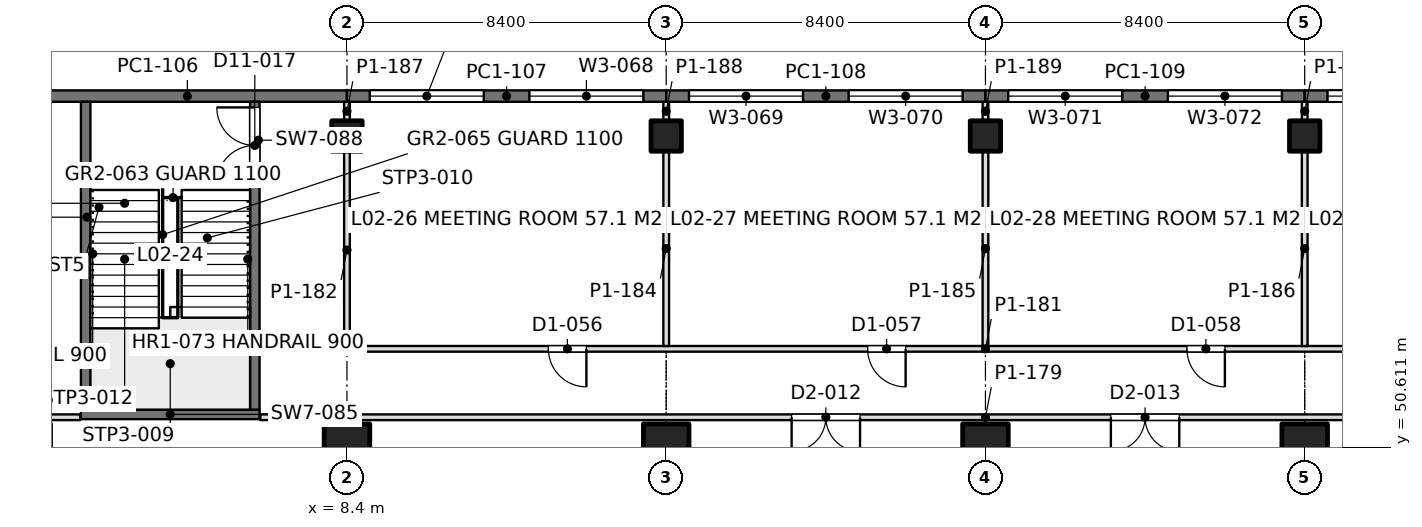
"""IFC4 building model, lengths in metres.
Left out: names, types, materials, properties, quantities, classifications, styles, units other than length and angle.
Written with IfcOpenShell. Run it as: python <this file> out.ifc"""

import sys

from ifc_helpers import new_model, si_unit, direction, frame, frame_2d, origin, origin_2d, place, context, subcontext, project, spatial, rectangle, extrude, element, fill, save


model = new_model("IFC4")
c1 = context("Model", 3, precision=1e-05, world=origin(), true_north=direction((0.0, 1.0)))
c2 = subcontext(c1, "Body", "Model", "MODEL_VIEW")
j1 = project(units=[si_unit("LENGTHUNIT", "METRE"), si_unit("PLANEANGLEUNIT", "RADIAN")], contexts=[c1])
p1 = place(None, origin())
s1 = spatial("IfcSite", under=j1, at=p1, CompositionType="ELEMENT")
p2 = place(p1, origin())
s2 = spatial("IfcBuilding", under=s1, at=p2, CompositionType="ELEMENT")
p3 = place(p2, frame((0.0, 0.0, 9.9)))
s3 = spatial("IfcBuildingStorey", under=s2, at=p3, CompositionType="ELEMENT", Elevation=9.9)
p4 = place(p3, frame((8.4, 50.4, 0.0), z_axis=(0.0, 0.0, 1.0), x_axis=(1.0, 0.0, 0.0)))
e1 = element("IfcColumn", 1, at=p4, inside=s3, PredefinedType="COLUMN", context=c2, shape_type="SweptSolid", body=[
    extrude(rectangle(XDim=1.2, YDim=1.65, at=origin_2d()), origin(), (0.0, 0.0, 1.0), 4.5),
])
p5 = place(p3, frame((8.4, 58.8, 0.0), z_axis=(0.0, 0.0, 1.0), x_axis=(1.0, 0.0, 0.0)))
e2 = element("IfcColumn", 2, at=p5, inside=s3, PredefinedType="COLUMN", context=c2, shape_type="SweptSolid", body=[
    extrude(rectangle(XDim=0.8, YDim=0.8, at=origin_2d()), origin(), (0.0, 0.0, 1.0), 4.5),
])
p6 = place(p3, frame((16.8, 50.4, 0.0), z_axis=(0.0, 0.0, 1.0), x_axis=(1.0, 0.0, 0.0)))
e3 = element("IfcColumn", 3, at=p6, inside=s3, PredefinedType="COLUMN", context=c2, shape_type="SweptSolid", body=[
    extrude(rectangle(XDim=1.2, YDim=1.65, at=origin_2d()), origin(), (0.0, 0.0, 1.0), 4.5),
])
p7 = place(p3, frame((16.8, 58.8, 0.0), z_axis=(0.0, 0.0, 1.0), x_axis=(1.0, 0.0, 0.0)))
e4 = element("IfcColumn", 4, at=p7, inside=s3, PredefinedType="COLUMN", context=c2, shape_type="SweptSolid", body=[
    extrude(rectangle(XDim=0.8, YDim=0.8, at=origin_2d()), origin(), (0.0, 0.0, 1.0), 4.5),
])
p8 = place(p3, frame((25.2, 50.4, 0.0), z_axis=(0.0, 0.0, 1.0), x_axis=(1.0, 0.0, 0.0)))
e5 = element("IfcColumn", 5, at=p8, inside=s3, PredefinedType="COLUMN", context=c2, shape_type="SweptSolid", body=[
    extrude(rectangle(XDim=1.2, YDim=1.65, at=origin_2d()), origin(), (0.0, 0.0, 1.0), 4.5),
])
p9 = place(p3, frame((25.2, 58.8, 0.0), z_axis=(0.0, 0.0, 1.0), x_axis=(1.0, 0.0, 0.0)))
e6 = element("IfcColumn", 6, at=p9, inside=s3, PredefinedType="COLUMN", context=c2, shape_type="SweptSolid", body=[
    extrude(rectangle(XDim=0.8, YDim=0.8, at=origin_2d()), origin(), (0.0, 0.0, 1.0), 4.5),
])
p10 = place(p3, frame((33.6, 50.4, 0.0), z_axis=(0.0, 0.0, 1.0), x_axis=(1.0, 0.0, 0.0)))
e7 = element("IfcColumn", 7, at=p10, inside=s3, PredefinedType="COLUMN", context=c2, shape_type="SweptSolid", body=[
    extrude(rectangle(XDim=1.2, YDim=1.65, at=origin_2d()), origin(), (0.0, 0.0, 1.0), 4.5),
])
p11 = place(p3, frame((33.6, 58.8, 0.0), z_axis=(0.0, 0.0, 1.0), x_axis=(1.0, 0.0, 0.0)))
e8 = element("IfcColumn", 8, at=p11, inside=s3, PredefinedType="COLUMN", context=c2, shape_type="SweptSolid", body=[
    extrude(rectangle(XDim=0.8, YDim=0.8, at=origin_2d()), origin(), (0.0, 0.0, 1.0), 4.5),
])
p12 = place(p3, frame((0.0, 59.85, 0.0), z_axis=(0.0, 0.0, 1.0), x_axis=(1.0, 0.0, 0.0)))
e9 = element("IfcWall", 9, at=p12, inside=s3, PredefinedType="SOLIDWALL", context=c2, shape_type="SweptSolid", body=[
    extrude(rectangle(XDim=8.4, YDim=0.3, at=frame_2d((4.2, 0.0))), origin(), (0.0, 0.0, 1.0), 4.3),
])
p13 = place(p3, frame((8.4, 59.85, 0.0), z_axis=(0.0, 0.0, 1.0), x_axis=(1.0, 0.0, 0.0)))
e10 = element("IfcWall", 10, at=p13, inside=s3, PredefinedType="SOLIDWALL", context=c2, shape_type="SweptSolid", body=[
    extrude(rectangle(XDim=8.4, YDim=0.3, at=frame_2d((4.2, 0.0))), origin(), (0.0, 0.0, 1.0), 4.3),
])
p14 = place(p13, frame((0.6, 0.0, 0.9)))
e11 = element("IfcOpeningElement", 11, at=p14, cuts=e10, PredefinedType="OPENING", context=c2, shape_type="SweptSolid", body=[
    extrude(rectangle(XDim=3.0, YDim=2.4, at=frame_2d((1.5, 1.2))), frame((0.0, 0.16, 0.0), z_axis=(0.0, -1.0, 0.0), x_axis=(1.0, 0.0, 0.0)), (0.0, 0.0, 1.0), 0.32),
])
p15 = place(p13, frame((4.8, 0.0, 0.9)))
e12 = element("IfcOpeningElement", 12, at=p15, cuts=e10, PredefinedType="OPENING", context=c2, shape_type="SweptSolid", body=[
    extrude(rectangle(XDim=3.0, YDim=2.4, at=frame_2d((1.5, 1.2))), frame((0.0, 0.16, 0.0), z_axis=(0.0, -1.0, 0.0), x_axis=(1.0, 0.0, 0.0)), (0.0, 0.0, 1.0), 0.32),
])
p16 = place(p3, frame((16.8, 59.85, 0.0), z_axis=(0.0, 0.0, 1.0), x_axis=(1.0, 0.0, 0.0)))
e13 = element("IfcWall", 13, at=p16, inside=s3, PredefinedType="SOLIDWALL", context=c2, shape_type="SweptSolid", body=[
    extrude(rectangle(XDim=8.4, YDim=0.3, at=frame_2d((4.2, 0.0))), origin(), (0.0, 0.0, 1.0), 4.3),
])
p17 = place(p16, frame((0.6, 0.0, 0.9)))
e14 = element("IfcOpeningElement", 14, at=p17, cuts=e13, PredefinedType="OPENING", context=c2, shape_type="SweptSolid", body=[
    extrude(rectangle(XDim=3.0, YDim=2.4, at=frame_2d((1.5, 1.2))), frame((0.0, 0.16, 0.0), z_axis=(0.0, -1.0, 0.0), x_axis=(1.0, 0.0, 0.0)), (0.0, 0.0, 1.0), 0.32),
])
p18 = place(p16, frame((4.8, 0.0, 0.9)))
e15 = element("IfcOpeningElement", 15, at=p18, cuts=e13, PredefinedType="OPENING", context=c2, shape_type="SweptSolid", body=[
    extrude(rectangle(XDim=3.0, YDim=2.4, at=frame_2d((1.5, 1.2))), frame((0.0, 0.16, 0.0), z_axis=(0.0, -1.0, 0.0), x_axis=(1.0, 0.0, 0.0)), (0.0, 0.0, 1.0), 0.32),
])
p19 = place(p3, frame((25.2, 59.85, 0.0), z_axis=(0.0, 0.0, 1.0), x_axis=(1.0, 0.0, 0.0)))
e16 = element("IfcWall", 16, at=p19, inside=s3, PredefinedType="SOLIDWALL", context=c2, shape_type="SweptSolid", body=[
    extrude(rectangle(XDim=8.4, YDim=0.3, at=frame_2d((4.2, 0.0))), origin(), (0.0, 0.0, 1.0), 4.3),
])
p20 = place(p19, frame((0.6, 0.0, 0.9)))
e17 = element("IfcOpeningElement", 17, at=p20, cuts=e16, PredefinedType="OPENING", context=c2, shape_type="SweptSolid", body=[
    extrude(rectangle(XDim=3.0, YDim=2.4, at=frame_2d((1.5, 1.2))), frame((0.0, 0.16, 0.0), z_axis=(0.0, -1.0, 0.0), x_axis=(1.0, 0.0, 0.0)), (0.0, 0.0, 1.0), 0.32),
])
p21 = place(p19, frame((4.8, 0.0, 0.9)))
e18 = element("IfcOpeningElement", 18, at=p21, cuts=e16, PredefinedType="OPENING", context=c2, shape_type="SweptSolid", body=[
    extrude(rectangle(XDim=3.0, YDim=2.4, at=frame_2d((1.5, 1.2))), frame((0.0, 0.16, 0.0), z_axis=(0.0, -1.0, 0.0), x_axis=(1.0, 0.0, 0.0)), (0.0, 0.0, 1.0), 0.32),
])
p22 = place(p3, frame((33.6, 59.85, 0.0), z_axis=(0.0, 0.0, 1.0), x_axis=(1.0, 0.0, 0.0)))
e19 = element("IfcWall", 19, at=p22, inside=s3, PredefinedType="SOLIDWALL", context=c2, shape_type="SweptSolid", body=[
    extrude(rectangle(XDim=8.4, YDim=0.3, at=frame_2d((4.2, 0.0))), origin(), (0.0, 0.0, 1.0), 4.3),
])
p23 = place(p22, frame((0.6, 0.0, 0.9)))
e20 = element("IfcOpeningElement", 20, at=p23, cuts=e19, PredefinedType="OPENING", context=c2, shape_type="SweptSolid", body=[
    extrude(rectangle(XDim=3.0, YDim=2.4, at=frame_2d((1.5, 1.2))), frame((0.0, 0.16, 0.0), z_axis=(0.0, -1.0, 0.0), x_axis=(1.0, 0.0, 0.0)), (0.0, 0.0, 1.0), 0.32),
])
p24 = place(p22, frame((4.8, 0.0, 0.9)))
e21 = element("IfcOpeningElement", 21, at=p24, cuts=e19, PredefinedType="OPENING", context=c2, shape_type="SweptSolid", body=[
    extrude(rectangle(XDim=3.0, YDim=2.4, at=frame_2d((1.5, 1.2))), frame((0.0, 0.16, 0.0), z_axis=(0.0, -1.0, 0.0), x_axis=(1.0, 0.0, 0.0)), (0.0, 0.0, 1.0), 0.32),
])
p25 = place(p3, frame((-1.0, 51.4, 0.0), z_axis=(0.0, 0.0, 1.0), x_axis=(1.0, 0.0, 0.0)))
e22 = element("IfcWall", 22, at=p25, inside=s3, PredefinedType="PARTITIONING", context=c2, shape_type="SweptSolid", body=[
    extrude(rectangle(XDim=2.38, YDim=0.15, at=frame_2d((1.19, 0.0))), origin(), (0.0, 0.0, 1.0), 3.65),
])
p26 = place(p3, frame((6.12, 51.4, 0.0), z_axis=(0.0, 0.0, 1.0), x_axis=(1.0, 0.0, 0.0)))
e23 = element("IfcWall", 23, at=p26, inside=s3, PredefinedType="PARTITIONING", context=c2, shape_type="SweptSolid", body=[
    extrude(rectangle(XDim=38.16, YDim=0.15, at=frame_2d((19.08, 0.0))), origin(), (0.0, 0.0, 1.0), 3.65),
])
p27 = place(p26, frame((13.98, 0.0, 0.0)))
e24 = element("IfcOpeningElement", 24, at=p27, cuts=e23, PredefinedType="OPENING", context=c2, shape_type="SweptSolid", body=[
    extrude(rectangle(XDim=1.8, YDim=2.2, at=frame_2d((0.9, 1.1))), frame((0.0, 0.085, 0.0), z_axis=(0.0, -1.0, 0.0), x_axis=(1.0, 0.0, 0.0)), (0.0, 0.0, 1.0), 0.17),
])
p28 = place(p26, frame((22.38, 0.0, 0.0)))
e25 = element("IfcOpeningElement", 25, at=p28, cuts=e23, PredefinedType="OPENING", context=c2, shape_type="SweptSolid", body=[
    extrude(rectangle(XDim=1.8, YDim=2.2, at=frame_2d((0.9, 1.1))), frame((0.0, 0.085, 0.0), z_axis=(0.0, -1.0, 0.0), x_axis=(1.0, 0.0, 0.0)), (0.0, 0.0, 1.0), 0.17),
])
p29 = place(p3, frame((8.4, 53.2, 0.0), z_axis=(0.0, 0.0, 1.0), x_axis=(1.0, 0.0, 0.0)))
e26 = element("IfcWall", 26, at=p29, inside=s3, PredefinedType="PARTITIONING", context=c2, shape_type="SweptSolid", body=[
    extrude(rectangle(XDim=33.6, YDim=0.15, at=frame_2d((16.8, 0.0))), origin(), (0.0, 0.0, 1.0), 3.65),
])
p30 = place(p29, frame((5.3, 0.0, 0.0)))
e27 = element("IfcOpeningElement", 27, at=p30, cuts=e26, PredefinedType="OPENING", context=c2, shape_type="SweptSolid", body=[
    extrude(rectangle(XDim=1.0, YDim=2.2, at=frame_2d((0.5, 1.1))), frame((0.0, 0.085, 0.0), z_axis=(0.0, -1.0, 0.0), x_axis=(1.0, 0.0, 0.0)), (0.0, 0.0, 1.0), 0.17),
])
p31 = place(p29, frame((13.7, 0.0, 0.0)))
e28 = element("IfcOpeningElement", 28, at=p31, cuts=e26, PredefinedType="OPENING", context=c2, shape_type="SweptSolid", body=[
    extrude(rectangle(XDim=1.0, YDim=2.2, at=frame_2d((0.5, 1.1))), frame((0.0, 0.085, 0.0), z_axis=(0.0, -1.0, 0.0), x_axis=(1.0, 0.0, 0.0)), (0.0, 0.0, 1.0), 0.17),
])
p32 = place(p29, frame((22.1, 0.0, 0.0)))
e29 = element("IfcOpeningElement", 29, at=p32, cuts=e26, PredefinedType="OPENING", context=c2, shape_type="SweptSolid", body=[
    extrude(rectangle(XDim=1.0, YDim=2.2, at=frame_2d((0.5, 1.1))), frame((0.0, 0.085, 0.0), z_axis=(0.0, -1.0, 0.0), x_axis=(1.0, 0.0, 0.0)), (0.0, 0.0, 1.0), 0.17),
])
p33 = place(p29, frame((30.5, 0.0, 0.0)))
e30 = element("IfcOpeningElement", 30, at=p33, cuts=e26, PredefinedType="OPENING", context=c2, shape_type="SweptSolid", body=[
    extrude(rectangle(XDim=1.0, YDim=2.2, at=frame_2d((0.5, 1.1))), frame((0.0, 0.085, 0.0), z_axis=(0.0, -1.0, 0.0), x_axis=(1.0, 0.0, 0.0)), (0.0, 0.0, 1.0), 0.17),
])
p34 = place(p3, frame((8.4, 53.2, 0.0), z_axis=(0.0, 0.0, 1.0), x_axis=(0.0, 1.0, 0.0)))
e31 = element("IfcWall", 31, at=p34, inside=s3, PredefinedType="PARTITIONING", context=c2, shape_type="SweptSolid", body=[
    extrude(rectangle(XDim=5.201, YDim=0.15, at=frame_2d((2.601, 0.0))), origin(), (0.0, 0.0, 1.0), 3.65),
])
p35 = place(p3, frame((8.4, 59.199, 0.0), z_axis=(0.0, 0.0, 1.0), x_axis=(0.0, 1.0, 0.0)))
e32 = element("IfcWall", 32, at=p35, inside=s3, PredefinedType="PARTITIONING", context=c2, shape_type="SweptSolid", body=[
    extrude(rectangle(XDim=0.503, YDim=0.15, at=frame_2d((0.251, 0.0))), origin(), (0.0, 0.0, 1.0), 4.3),
])
p36 = place(p3, frame((16.8, 53.274, 0.0), z_axis=(0.0, 0.0, 1.0), x_axis=(0.0, 1.0, 0.0)))
e33 = element("IfcWall", 33, at=p36, inside=s3, PredefinedType="PARTITIONING", context=c2, shape_type="SweptSolid", body=[
    extrude(rectangle(XDim=5.127, YDim=0.15, at=frame_2d((2.563, 0.0))), origin(), (0.0, 0.0, 1.0), 3.65),
])
p37 = place(p3, frame((16.8, 59.199, 0.0), z_axis=(0.0, 0.0, 1.0), x_axis=(0.0, 1.0, 0.0)))
e34 = element("IfcWall", 34, at=p37, inside=s3, PredefinedType="PARTITIONING", context=c2, shape_type="SweptSolid", body=[
    extrude(rectangle(XDim=0.503, YDim=0.15, at=frame_2d((0.251, 0.0))), origin(), (0.0, 0.0, 1.0), 4.3),
])
p38 = place(p3, frame((25.2, 53.274, 0.0), z_axis=(0.0, 0.0, 1.0), x_axis=(0.0, 1.0, 0.0)))
e35 = element("IfcWall", 35, at=p38, inside=s3, PredefinedType="PARTITIONING", context=c2, shape_type="SweptSolid", body=[
    extrude(rectangle(XDim=5.127, YDim=0.15, at=frame_2d((2.563, 0.0))), origin(), (0.0, 0.0, 1.0), 3.65),
])
p39 = place(p3, frame((25.2, 59.199, 0.0), z_axis=(0.0, 0.0, 1.0), x_axis=(0.0, 1.0, 0.0)))
e36 = element("IfcWall", 36, at=p39, inside=s3, PredefinedType="PARTITIONING", context=c2, shape_type="SweptSolid", body=[
    extrude(rectangle(XDim=0.503, YDim=0.15, at=frame_2d((0.251, 0.0))), origin(), (0.0, 0.0, 1.0), 4.3),
])
p40 = place(p3, frame((33.6, 53.274, 0.0), z_axis=(0.0, 0.0, 1.0), x_axis=(0.0, 1.0, 0.0)))
e37 = element("IfcWall", 37, at=p40, inside=s3, PredefinedType="PARTITIONING", context=c2, shape_type="SweptSolid", body=[
    extrude(rectangle(XDim=5.127, YDim=0.15, at=frame_2d((2.563, 0.0))), origin(), (0.0, 0.0, 1.0), 3.65),
])
p41 = place(p3, frame((33.6, 59.199, 0.0), z_axis=(0.0, 0.0, 1.0), x_axis=(0.0, 1.0, 0.0)))
e38 = element("IfcWall", 38, at=p41, inside=s3, PredefinedType="PARTITIONING", context=c2, shape_type="SweptSolid", body=[
    extrude(rectangle(XDim=0.503, YDim=0.15, at=frame_2d((0.251, 0.0))), origin(), (0.0, 0.0, 1.0), 4.3),
])
p42 = place(p3, frame((1.525, 59.702, 0.0), z_axis=(0.0, 0.0, 1.0), x_axis=(0.0, -1.0, 0.0)))
e39 = element("IfcWall", 39, at=p42, inside=s3, PredefinedType="SOLIDWALL", context=c2, shape_type="SweptSolid", body=[
    extrude(rectangle(XDim=8.102, YDim=0.25, at=frame_2d((4.051, 0.0))), origin(), (0.0, 0.0, 1.0), 4.5),
])
p43 = place(p3, frame((5.975, 59.702, 0.0), z_axis=(0.0, 0.0, 1.0), x_axis=(0.0, -1.0, 0.0)))
e40 = element("IfcWall", 40, at=p43, inside=s3, PredefinedType="SOLIDWALL", context=c2, shape_type="SweptSolid", body=[
    extrude(rectangle(XDim=8.102, YDim=0.25, at=frame_2d((4.051, 0.0))), origin(), (0.0, 0.0, 1.0), 4.5),
])
p44 = place(p43, frame((0.15, 0.0, 0.0)))
e41 = element("IfcOpeningElement", 41, at=p44, cuts=e40, PredefinedType="OPENING", context=c2, shape_type="SweptSolid", body=[
    extrude(rectangle(XDim=2.0, YDim=2.2, at=frame_2d((1.0, 1.1))), frame((0.0, 0.135, 0.0), z_axis=(0.0, -1.0, 0.0), x_axis=(1.0, 0.0, 0.0)), (0.0, 0.0, 1.0), 0.27),
])
p45 = place(p3, frame((1.4, 51.475, 0.0), z_axis=(0.0, 0.0, 1.0), x_axis=(1.0, 0.0, 0.0)))
e42 = element("IfcWall", 42, at=p45, inside=s3, PredefinedType="SOLIDWALL", context=c2, shape_type="SweptSolid", body=[
    extrude(rectangle(XDim=4.7, YDim=0.25, at=frame_2d((2.35, 0.0))), origin(), (0.0, 0.0, 1.0), 4.5),
])
p46 = place(p14, origin())
e43 = element("IfcWindow", 43, at=p46, inside=s3, PartitioningType="SINGLE_PANEL", PredefinedType="WINDOW", context=c2, shape_type="SweptSolid", body=[
    extrude(rectangle(XDim=3.0, YDim=2.4, at=frame_2d((1.5, 1.2))), frame((0.0, 0.03, 0.0), z_axis=(0.0, -1.0, 0.0), x_axis=(1.0, 0.0, 0.0)), (0.0, 0.0, 1.0), 0.06),
])
fill(e11, e43)
p47 = place(p15, origin())
e44 = element("IfcWindow", 44, at=p47, inside=s3, PartitioningType="SINGLE_PANEL", PredefinedType="WINDOW", context=c2, shape_type="SweptSolid", body=[
    extrude(rectangle(XDim=3.0, YDim=2.4, at=frame_2d((1.5, 1.2))), frame((0.0, 0.03, 0.0), z_axis=(0.0, -1.0, 0.0), x_axis=(1.0, 0.0, 0.0)), (0.0, 0.0, 1.0), 0.06),
])
fill(e12, e44)
p48 = place(p17, origin())
e45 = element("IfcWindow", 45, at=p48, inside=s3, PartitioningType="SINGLE_PANEL", PredefinedType="WINDOW", context=c2, shape_type="SweptSolid", body=[
    extrude(rectangle(XDim=3.0, YDim=2.4, at=frame_2d((1.5, 1.2))), frame((0.0, 0.03, 0.0), z_axis=(0.0, -1.0, 0.0), x_axis=(1.0, 0.0, 0.0)), (0.0, 0.0, 1.0), 0.06),
])
fill(e14, e45)
p49 = place(p18, origin())
e46 = element("IfcWindow", 46, at=p49, inside=s3, PartitioningType="SINGLE_PANEL", PredefinedType="WINDOW", context=c2, shape_type="SweptSolid", body=[
    extrude(rectangle(XDim=3.0, YDim=2.4, at=frame_2d((1.5, 1.2))), frame((0.0, 0.03, 0.0), z_axis=(0.0, -1.0, 0.0), x_axis=(1.0, 0.0, 0.0)), (0.0, 0.0, 1.0), 0.06),
])
fill(e15, e46)
p50 = place(p20, origin())
e47 = element("IfcWindow", 47, at=p50, inside=s3, PartitioningType="SINGLE_PANEL", PredefinedType="WINDOW", context=c2, shape_type="SweptSolid", body=[
    extrude(rectangle(XDim=3.0, YDim=2.4, at=frame_2d((1.5, 1.2))), frame((0.0, 0.03, 0.0), z_axis=(0.0, -1.0, 0.0), x_axis=(1.0, 0.0, 0.0)), (0.0, 0.0, 1.0), 0.06),
])
fill(e17, e47)
p51 = place(p21, origin())
e48 = element("IfcWindow", 48, at=p51, inside=s3, PartitioningType="SINGLE_PANEL", PredefinedType="WINDOW", context=c2, shape_type="SweptSolid", body=[
    extrude(rectangle(XDim=3.0, YDim=2.4, at=frame_2d((1.5, 1.2))), frame((0.0, 0.03, 0.0), z_axis=(0.0, -1.0, 0.0), x_axis=(1.0, 0.0, 0.0)), (0.0, 0.0, 1.0), 0.06),
])
fill(e18, e48)
p52 = place(p23, origin())
e49 = element("IfcWindow", 49, at=p52, inside=s3, PartitioningType="SINGLE_PANEL", PredefinedType="WINDOW", context=c2, shape_type="SweptSolid", body=[
    extrude(rectangle(XDim=3.0, YDim=2.4, at=frame_2d((1.5, 1.2))), frame((0.0, 0.03, 0.0), z_axis=(0.0, -1.0, 0.0), x_axis=(1.0, 0.0, 0.0)), (0.0, 0.0, 1.0), 0.06),
])
fill(e20, e49)
p53 = place(p27, frame((1.8, 0.0, 0.0), z_axis=(0.0, 0.0, 1.0), x_axis=(-1.0, 0.0, 0.0)))
e50 = element("IfcDoor", 50, at=p53, inside=s3, OperationType="DOUBLE_DOOR_SINGLE_SWING", PredefinedType="DOOR", context=c2, shape_type="SweptSolid", body=[
    extrude(rectangle(XDim=1.8, YDim=2.2, at=frame_2d((0.9, 1.1))), frame((0.0, 0.025, 0.0), z_axis=(0.0, -1.0, 0.0), x_axis=(1.0, 0.0, 0.0)), (0.0, 0.0, 1.0), 0.05),
])
fill(e24, e50)
p54 = place(p28, frame((1.8, 0.0, 0.0), z_axis=(0.0, 0.0, 1.0), x_axis=(-1.0, 0.0, 0.0)))
e51 = element("IfcDoor", 51, at=p54, inside=s3, OperationType="DOUBLE_DOOR_SINGLE_SWING", PredefinedType="DOOR", context=c2, shape_type="SweptSolid", body=[
    extrude(rectangle(XDim=1.8, YDim=2.2, at=frame_2d((0.9, 1.1))), frame((0.0, 0.025, 0.0), z_axis=(0.0, -1.0, 0.0), x_axis=(1.0, 0.0, 0.0)), (0.0, 0.0, 1.0), 0.05),
])
fill(e25, e51)
p55 = place(p30, frame((1.0, 0.0, 0.0), z_axis=(0.0, 0.0, 1.0), x_axis=(-1.0, 0.0, 0.0)))
e52 = element("IfcDoor", 52, at=p55, inside=s3, OperationType="SINGLE_SWING_LEFT", PredefinedType="DOOR", context=c2, shape_type="SweptSolid", body=[
    extrude(rectangle(XDim=1.0, YDim=2.2, at=frame_2d((0.5, 1.1))), frame((0.0, 0.025, 0.0), z_axis=(0.0, -1.0, 0.0), x_axis=(1.0, 0.0, 0.0)), (0.0, 0.0, 1.0), 0.05),
])
fill(e27, e52)
p56 = place(p31, frame((1.0, 0.0, 0.0), z_axis=(0.0, 0.0, 1.0), x_axis=(-1.0, 0.0, 0.0)))
e53 = element("IfcDoor", 53, at=p56, inside=s3, OperationType="SINGLE_SWING_LEFT", PredefinedType="DOOR", context=c2, shape_type="SweptSolid", body=[
    extrude(rectangle(XDim=1.0, YDim=2.2, at=frame_2d((0.5, 1.1))), frame((0.0, 0.025, 0.0), z_axis=(0.0, -1.0, 0.0), x_axis=(1.0, 0.0, 0.0)), (0.0, 0.0, 1.0), 0.05),
])
fill(e28, e53)
p57 = place(p32, frame((1.0, 0.0, 0.0), z_axis=(0.0, 0.0, 1.0), x_axis=(-1.0, 0.0, 0.0)))
e54 = element("IfcDoor", 54, at=p57, inside=s3, OperationType="SINGLE_SWING_LEFT", PredefinedType="DOOR", context=c2, shape_type="SweptSolid", body=[
    extrude(rectangle(XDim=1.0, YDim=2.2, at=frame_2d((0.5, 1.1))), frame((0.0, 0.025, 0.0), z_axis=(0.0, -1.0, 0.0), x_axis=(1.0, 0.0, 0.0)), (0.0, 0.0, 1.0), 0.05),
])
fill(e29, e54)
p58 = place(p44, frame((2.0, 0.0, 0.0), z_axis=(0.0, 0.0, 1.0), x_axis=(-1.0, 0.0, 0.0)))
e55 = element("IfcDoor", 55, at=p58, inside=s3, OperationType="DOUBLE_DOOR_SINGLE_SWING", PredefinedType="DOOR", context=c2, shape_type="SweptSolid", body=[
    extrude(rectangle(XDim=2.0, YDim=2.2, at=frame_2d((1.0, 1.1))), frame((0.0, 0.025, 0.0), z_axis=(0.0, -1.0, 0.0), x_axis=(1.0, 0.0, 0.0)), (0.0, 0.0, 1.0), 0.05),
])
fill(e41, e55)
save(model, sys.argv[1])
